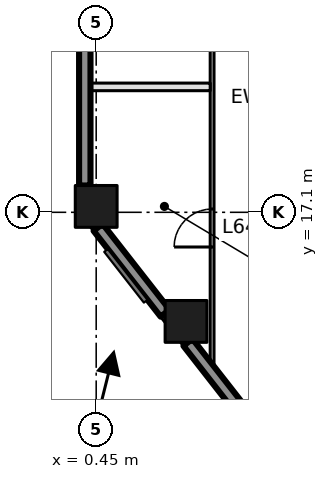
"""IFC4 building model, lengths in metres.
Left out: names, types, materials, properties, quantities, classifications, styles, units other than length and angle.
Written with IfcOpenShell. Run it as: python <this file> out.ifc"""

import sys

from ifc_helpers import new_model, si_unit, direction, frame, frame_2d, origin, origin_2d, place, context, subcontext, project, spatial, rectangle, extrude, element, fill, save


model = new_model("IFC4")
c1 = context("Model", 3, precision=1e-05, world=origin(), true_north=direction((0.0, 1.0)))
c2 = subcontext(c1, "Body", "Model", "MODEL_VIEW")
j1 = project(units=[si_unit("LENGTHUNIT", "METRE"), si_unit("PLANEANGLEUNIT", "RADIAN")], contexts=[c1])
p1 = place(None, origin())
s1 = spatial("IfcSite", under=j1, at=p1, CompositionType="ELEMENT")
p2 = place(p1, origin())
s2 = spatial("IfcBuilding", under=s1, at=p2, CompositionType="ELEMENT")
p3 = place(p2, frame((0.0, 0.0, 280.2)))
s3 = spatial("IfcBuildingStorey", under=s2, at=p3, CompositionType="ELEMENT", Elevation=280.2)
for number, where, z_axis, x_axis in (
    (1, (0.45, 17.255, 0.0), (0.0, 0.0, 1.0), (1.0, 0.0, 0.0)),
    (2, (2.814, 14.229, 0.0), (0.0, 0.0, 1.0), (1.0, 0.0, 0.0)),
):
    element("IfcColumn", number, at=place(p3, frame(where, z_axis=z_axis, x_axis=x_axis)), inside=s3, PredefinedType="COLUMN", context=c2, shape_type="SweptSolid", body=[
        extrude(rectangle(XDim=1.1, YDim=1.1, at=origin_2d()), origin(), (0.0, 0.0, 1.0), 4.2),
    ])
p4 = place(p3, frame((3.5, 13.107, 0.0), z_axis=(0.0, 0.0, 1.0), x_axis=(0.0, 1.0, 0.0)))
e3 = element("IfcWall", 3, at=p4, inside=s3, PredefinedType="PARTITIONING", context=c2, shape_type="SweptSolid", body=[
    extrude(rectangle(XDim=28.293, YDim=0.1, at=frame_2d((14.146, 0.0))), origin(), (0.0, 0.0, 1.0), 3.75),
])
p5 = place(p4, frame((3.08, 0.0, 0.0)))
e4 = element("IfcOpeningElement", 4, at=p5, cuts=e3, PredefinedType="OPENING", context=c2, shape_type="SweptSolid", body=[
    extrude(rectangle(XDim=1.0, YDim=2.1, at=frame_2d((0.5, 1.05))), frame((0.0, 0.06, 0.0), z_axis=(0.0, -1.0, 0.0), x_axis=(1.0, 0.0, 0.0)), (0.0, 0.0, 1.0), 0.12),
])
p6 = place(p4, frame((12.773, 0.0, 0.0)))
e5 = element("IfcOpeningElement", 5, at=p6, cuts=e3, PredefinedType="OPENING", context=c2, shape_type="SweptSolid", body=[
    extrude(rectangle(XDim=1.0, YDim=2.1, at=frame_2d((0.5, 1.05))), frame((0.0, 0.06, 0.0), z_axis=(0.0, -1.0, 0.0), x_axis=(1.0, 0.0, 0.0)), (0.0, 0.0, 1.0), 0.12),
])
p7 = place(p4, frame((22.873, 0.0, 0.0)))
e6 = element("IfcOpeningElement", 6, at=p7, cuts=e3, PredefinedType="OPENING", context=c2, shape_type="SweptSolid", body=[
    extrude(rectangle(XDim=1.0, YDim=2.1, at=frame_2d((0.5, 1.05))), frame((0.0, 0.06, 0.0), z_axis=(0.0, -1.0, 0.0), x_axis=(1.0, 0.0, 0.0)), (0.0, 0.0, 1.0), 0.12),
])
p8 = place(p3, frame((3.45, 20.4, 0.0), z_axis=(0.0, 0.0, 1.0), x_axis=(-1.0, 0.0, 0.0)))
e7 = element("IfcWall", 7, at=p8, inside=s3, PredefinedType="PARTITIONING", context=c2, shape_type="SweptSolid", body=[
    extrude(rectangle(XDim=3.15, YDim=0.2, at=frame_2d((1.575, 0.0))), origin(), (0.0, 0.0, 1.0), 3.75),
])
p9 = place(p3, frame((0.15, 22.404, 0.0), z_axis=(0.0, 0.0, 1.0), x_axis=(0.0, -1.0, 0.0)))
e8 = element("IfcWall", 8, at=p9, inside=s3, PredefinedType="SOLIDWALL", context=c2, shape_type="SweptSolid", body=[
    extrude(rectangle(XDim=4.599, YDim=0.3, at=frame_2d((2.3, 0.0))), origin(), (0.0, 0.0, 1.0), 3.0),
])
p10 = place(p3, frame((0.499, 16.705, 0.0), z_axis=(0.0, 0.0, 1.0), x_axis=(0.615648999949, -0.78802050028, 0.0)))
e9 = element("IfcWall", 9, at=p10, inside=s3, PredefinedType="SOLIDWALL", context=c2, shape_type="SweptSolid", body=[
    extrude(rectangle(XDim=2.867, YDim=0.3, at=frame_2d((1.433, 0.0))), origin(), (0.0, 0.0, 1.0), 3.0),
])
p11 = place(p3, frame((2.863, 13.679, 0.0), z_axis=(0.0, 0.0, 1.0), x_axis=(0.615727244794, -0.787959364446, 0.0)))
e10 = element("IfcWall", 10, at=p11, inside=s3, PredefinedType="SOLIDWALL", context=c2, shape_type="SweptSolid", body=[
    extrude(rectangle(XDim=4.726, YDim=0.3, at=frame_2d((2.363, 0.0))), origin(), (0.0, 0.0, 1.0), 3.0),
])
p12 = place(p5, origin())
e11 = element("IfcDoor", 11, at=p12, inside=s3, OperationType="SINGLE_SWING_LEFT", PredefinedType="DOOR", context=c2, shape_type="SweptSolid", body=[
    extrude(rectangle(XDim=1.0, YDim=2.1, at=frame_2d((0.5, 1.05))), frame((0.0, 0.025, 0.0), z_axis=(0.0, -1.0, 0.0), x_axis=(1.0, 0.0, 0.0)), (0.0, 0.0, 1.0), 0.05),
])
fill(e4, e11)
save(model, sys.argv[1])
